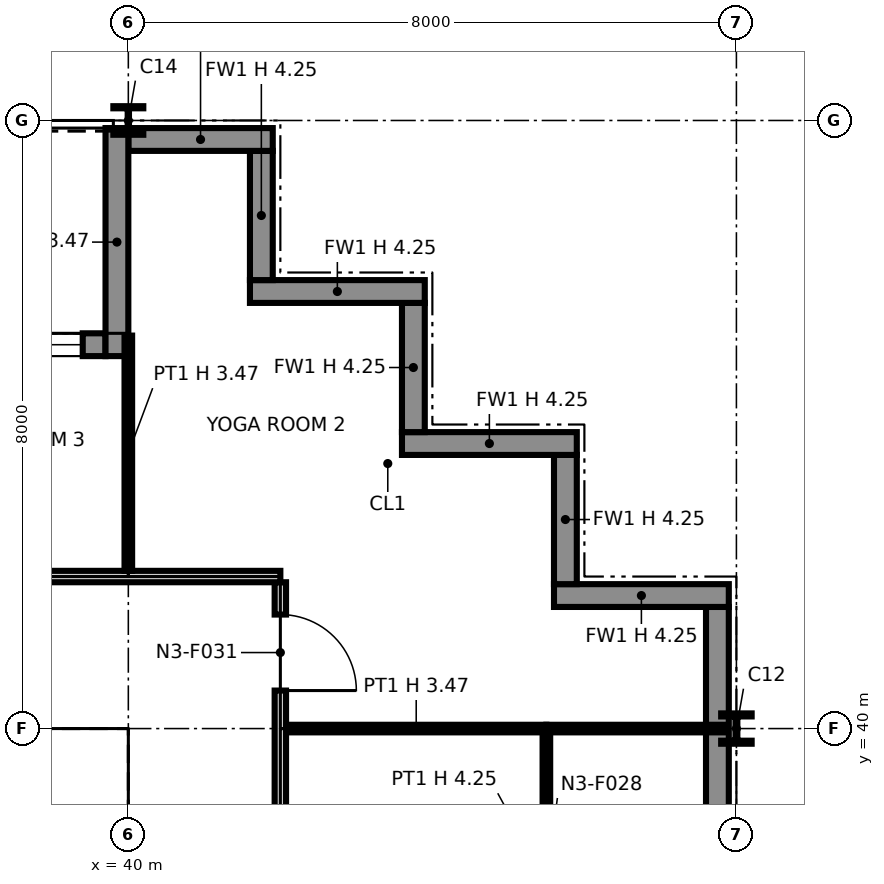
"""IFC4 building model, lengths in metres.
Left out: names, types, materials, properties, quantities, classifications, styles, units other than length and angle.
Written with IfcOpenShell. Run it as: python <this file> out.ifc"""

import sys

from ifc_helpers import new_model, si_unit, direction, frame, frame_2d, origin, origin_2d, place, context, subcontext, project, spatial, polyline, rectangle, i_section, outline, extrude, element, fill, save


model = new_model("IFC4")
c1 = context("Model", 3, precision=1e-05, world=origin(), true_north=direction((0.0, 1.0)))
c2 = subcontext(c1, "Body", "Model", "MODEL_VIEW")
j1 = project(units=[si_unit("LENGTHUNIT", "METRE"), si_unit("PLANEANGLEUNIT", "RADIAN")], contexts=[c1])
p1 = place(None, origin())
s1 = spatial("IfcSite", under=j1, at=p1, CompositionType="ELEMENT")
p2 = place(p1, origin())
s2 = spatial("IfcBuilding", under=s1, at=p2, CompositionType="ELEMENT")
p3 = place(p2, frame((0.0, 0.0, 70.0)))
s3 = spatial("IfcBuildingStorey", under=s2, at=p3, CompositionType="ELEMENT", Elevation=70.0)
p4 = place(p3, frame((40.0, 40.0, 0.0), z_axis=(0.0, 0.0, 1.0), x_axis=(1.0, 0.0, 0.0)))
e1 = element("IfcColumn", 1, at=p4, inside=s3, PredefinedType="COLUMN", context=c2, shape_type="SweptSolid", body=[
    extrude(i_section(OverallWidth=0.371, OverallDepth=0.361, WebThickness=0.012, FlangeThickness=0.02, at=origin_2d()), origin(), (0.0, 0.0, 1.0), 4.25),
])
p5 = place(p3, frame((40.0, 48.0, 0.0), z_axis=(0.0, 0.0, 1.0), x_axis=(1.0, 0.0, 0.0)))
e2 = element("IfcColumn", 2, at=p5, inside=s3, PredefinedType="COLUMN", context=c2, shape_type="SweptSolid", body=[
    extrude(i_section(OverallWidth=0.394, OverallDepth=0.376, WebThickness=0.017, FlangeThickness=0.028, at=origin_2d()), origin(), (0.0, 0.0, 1.0), 4.25),
])
p6 = place(p3, frame((48.0, 40.0, 0.0), z_axis=(0.0, 0.0, 1.0), x_axis=(1.0, 0.0, 0.0)))
e3 = element("IfcColumn", 3, at=p6, inside=s3, PredefinedType="COLUMN", context=c2, shape_type="SweptSolid", body=[
    extrude(i_section(OverallWidth=0.401, OverallDepth=0.399, WebThickness=0.025, FlangeThickness=0.04, at=origin_2d()), origin(), (0.0, 0.0, 1.0), 4.25),
])
p7 = place(p3, frame((47.75, 32.0, 0.0), z_axis=(0.0, 0.0, 1.0), x_axis=(0.0, 1.0, 0.0)))
e4 = element("IfcWall", 4, at=p7, inside=s3, PredefinedType="SOLIDWALL", context=c2, shape_type="SweptSolid", body=[
    extrude(rectangle(XDim=9.6, YDim=0.3, at=frame_2d((4.8, 0.0))), origin(), (0.0, 0.0, 1.0), 4.25),
])
p8 = place(p3, frame((47.9, 41.75, 0.0), z_axis=(0.0, 0.0, 1.0), x_axis=(-1.0, 0.0, 0.0)))
e5 = element("IfcWall", 5, at=p8, inside=s3, PredefinedType="SOLIDWALL", context=c2, shape_type="SweptSolid", body=[
    extrude(rectangle(XDim=2.3, YDim=0.3, at=frame_2d((1.15, 0.0))), origin(), (0.0, 0.0, 1.0), 4.25),
])
p9 = place(p3, frame((45.75, 41.9, 0.0), z_axis=(0.0, 0.0, 1.0), x_axis=(0.0, 1.0, 0.0)))
e6 = element("IfcWall", 6, at=p9, inside=s3, PredefinedType="SOLIDWALL", context=c2, shape_type="SweptSolid", body=[
    extrude(rectangle(XDim=1.7, YDim=0.3, at=frame_2d((0.85, 0.0))), origin(), (0.0, 0.0, 1.0), 4.25),
])
p10 = place(p3, frame((45.9, 43.75, 0.0), z_axis=(0.0, 0.0, 1.0), x_axis=(-1.0, 0.0, 0.0)))
e7 = element("IfcWall", 7, at=p10, inside=s3, PredefinedType="SOLIDWALL", context=c2, shape_type="SweptSolid", body=[
    extrude(rectangle(XDim=2.3, YDim=0.3, at=frame_2d((1.15, 0.0))), origin(), (0.0, 0.0, 1.0), 4.25),
])
p11 = place(p3, frame((43.75, 43.9, 0.0), z_axis=(0.0, 0.0, 1.0), x_axis=(0.0, 1.0, 0.0)))
e8 = element("IfcWall", 8, at=p11, inside=s3, PredefinedType="SOLIDWALL", context=c2, shape_type="SweptSolid", body=[
    extrude(rectangle(XDim=1.7, YDim=0.3, at=frame_2d((0.85, 0.0))), origin(), (0.0, 0.0, 1.0), 4.25),
])
p12 = place(p3, frame((43.9, 45.75, 0.0), z_axis=(0.0, 0.0, 1.0), x_axis=(-1.0, 0.0, 0.0)))
e9 = element("IfcWall", 9, at=p12, inside=s3, PredefinedType="SOLIDWALL", context=c2, shape_type="SweptSolid", body=[
    extrude(rectangle(XDim=2.3, YDim=0.3, at=frame_2d((1.15, 0.0))), origin(), (0.0, 0.0, 1.0), 4.25),
])
p13 = place(p3, frame((41.75, 45.9, 0.0), z_axis=(0.0, 0.0, 1.0), x_axis=(0.0, 1.0, 0.0)))
e10 = element("IfcWall", 10, at=p13, inside=s3, PredefinedType="SOLIDWALL", context=c2, shape_type="SweptSolid", body=[
    extrude(rectangle(XDim=1.7, YDim=0.3, at=frame_2d((0.85, 0.0))), origin(), (0.0, 0.0, 1.0), 4.25),
])
p14 = place(p3, frame((41.9, 47.75, 0.0), z_axis=(0.0, 0.0, 1.0), x_axis=(-1.0, 0.0, 0.0)))
e11 = element("IfcWall", 11, at=p14, inside=s3, PredefinedType="SOLIDWALL", context=c2, shape_type="SweptSolid", body=[
    extrude(rectangle(XDim=1.9, YDim=0.3, at=frame_2d((0.95, 0.0))), origin(), (0.0, 0.0, 1.0), 4.25),
])
p15 = place(p3, frame((39.7, 45.05, 0.0), z_axis=(0.0, 0.0, 1.0), x_axis=(-1.0, 0.0, 0.0)))
e12 = element("IfcWall", 12, at=p15, inside=s3, PredefinedType="SOLIDWALL", context=c2, shape_type="SweptSolid", body=[
    extrude(rectangle(XDim=7.4, YDim=0.3, at=frame_2d((3.7, 0.0))), origin(), (0.0, 0.0, 1.0), 4.25),
])
p16 = place(p15, frame((0.3, 0.0, 0.9)))
e13 = element("IfcOpeningElement", 13, at=p16, cuts=e12, PredefinedType="OPENING", context=c2, shape_type="SweptSolid", body=[
    extrude(rectangle(XDim=2.8, YDim=2.2, at=frame_2d((1.4, 1.1))), frame((0.0, 0.16, 0.0), z_axis=(0.0, -1.0, 0.0), x_axis=(1.0, 0.0, 0.0)), (0.0, 0.0, 1.0), 0.32),
])
p17 = place(p15, frame((4.7, 0.0, 0.0)))
e14 = element("IfcOpeningElement", 14, at=p17, cuts=e12, PredefinedType="OPENING", context=c2, shape_type="SweptSolid", body=[
    extrude(rectangle(XDim=2.0, YDim=2.4, at=frame_2d((1.0, 1.2))), frame((0.0, 0.16, 0.0), z_axis=(0.0, -1.0, 0.0), x_axis=(1.0, 0.0, 0.0)), (0.0, 0.0, 1.0), 0.32),
])
p18 = place(p3, frame((39.85, 47.9, 0.0), z_axis=(0.0, 0.0, 1.0), x_axis=(0.0, -1.0, 0.0)))
e15 = element("IfcWall", 15, at=p18, inside=s3, PredefinedType="SOLIDWALL", context=c2, shape_type="SweptSolid", body=[
    extrude(rectangle(XDim=3.0, YDim=0.3, at=frame_2d((1.5, 0.0))), origin(), (0.0, 0.0, 1.0), 3.469),
])
p19 = place(p3, frame((24.65, 39.25, 0.0), z_axis=(0.0, 0.0, 1.0), x_axis=(1.0, 0.0, 0.0)))
e16 = element("IfcWall", 16, at=p19, inside=s3, PredefinedType="PARTITIONING", context=c2, shape_type="SweptSolid", body=[
    extrude(outline(polyline([(0.0, 0.0), (14.7, 0.0), (14.7, 4.25), (7.469, 4.25), (7.469, 3.632), (7.231, 3.632), (7.23, 4.25), (0.0, 4.25), (0.0, 0.0)])), frame((0.0, 0.1, 0.0), z_axis=(0.0, -1.0, 0.0), x_axis=(1.0, 0.0, 0.0)), (0.0, 0.0, 1.0), 0.2),
])
p20 = place(p3, frame((39.25, 32.85, 0.0), z_axis=(0.0, 0.0, 1.0), x_axis=(0.0, 1.0, 0.0)))
e17 = element("IfcWall", 17, at=p20, inside=s3, PredefinedType="PARTITIONING", context=c2, shape_type="SweptSolid", body=[
    extrude(rectangle(XDim=6.3, YDim=0.2, at=frame_2d((3.15, 0.0))), origin(), (0.0, 0.0, 1.0), 4.25),
])
p21 = place(p3, frame((42.0, 16.0, 0.0), z_axis=(0.0, 0.0, 1.0), x_axis=(0.0, 1.0, 0.0)))
e18 = element("IfcWall", 18, at=p21, inside=s3, PredefinedType="PARTITIONING", context=c2, shape_type="SweptSolid", body=[
    extrude(outline(polyline([(0.0, 0.0), (25.925, 0.0), (25.925, 4.25), (24.3, 4.25), (24.298, 3.47), (23.702, 3.47), (23.7, 4.25), (20.3, 4.25), (20.298, 3.47), (19.702, 3.47), (19.7, 4.25), (16.3, 4.25), (16.298, 3.47), (15.702, 3.47), (15.7, 4.25), (12.3, 4.25), (12.298, 3.47), (11.702, 3.47), (11.7, 4.25), (8.3, 4.25), (8.298, 3.47), (7.702, 3.47), (7.7, 4.25), (4.3, 4.25), (4.298, 3.47), (3.702, 3.47), (3.7, 4.25), (0.0, 4.25), (0.0, 0.0)])), frame((0.0, 0.075, 0.0), z_axis=(0.0, -1.0, 0.0), x_axis=(1.0, 0.0, 0.0)), (0.0, 0.0, 1.0), 0.15),
])
p22 = place(p21, frame((2.5, 0.0, 0.0), z_axis=(0.0, 0.0, 1.0), x_axis=(-1.0, 0.0, 0.0)))
e19 = element("IfcOpeningElement", 19, at=p22, cuts=e18, PredefinedType="OPENING", context=c2, shape_type="SweptSolid", body=[
    extrude(rectangle(XDim=1.0, YDim=2.1, at=frame_2d((0.5, 1.05))), frame((0.0, 0.085, 0.0), z_axis=(0.0, -1.0, 0.0), x_axis=(1.0, 0.0, 0.0)), (0.0, 0.0, 1.0), 0.17),
])
p23 = place(p21, frame((6.5, 0.0, 0.0), z_axis=(0.0, 0.0, 1.0), x_axis=(-1.0, 0.0, 0.0)))
e20 = element("IfcOpeningElement", 20, at=p23, cuts=e18, PredefinedType="OPENING", context=c2, shape_type="SweptSolid", body=[
    extrude(rectangle(XDim=1.0, YDim=2.1, at=frame_2d((0.5, 1.05))), frame((0.0, 0.085, 0.0), z_axis=(0.0, -1.0, 0.0), x_axis=(1.0, 0.0, 0.0)), (0.0, 0.0, 1.0), 0.17),
])
p24 = place(p21, frame((9.3, 0.0, 0.0), z_axis=(0.0, 0.0, 1.0), x_axis=(-1.0, 0.0, 0.0)))
e21 = element("IfcOpeningElement", 21, at=p24, cuts=e18, PredefinedType="OPENING", context=c2, shape_type="SweptSolid", body=[
    extrude(rectangle(XDim=1.0, YDim=2.1, at=frame_2d((0.5, 1.05))), frame((0.0, 0.085, 0.0), z_axis=(0.0, -1.0, 0.0), x_axis=(1.0, 0.0, 0.0)), (0.0, 0.0, 1.0), 0.17),
])
p25 = place(p21, frame((14.5, 0.0, 0.0), z_axis=(0.0, 0.0, 1.0), x_axis=(-1.0, 0.0, 0.0)))
e22 = element("IfcOpeningElement", 22, at=p25, cuts=e18, PredefinedType="OPENING", context=c2, shape_type="SweptSolid", body=[
    extrude(rectangle(XDim=1.0, YDim=2.1, at=frame_2d((0.5, 1.05))), frame((0.0, 0.085, 0.0), z_axis=(0.0, -1.0, 0.0), x_axis=(1.0, 0.0, 0.0)), (0.0, 0.0, 1.0), 0.17),
])
p26 = place(p21, frame((18.5, 0.0, 0.0), z_axis=(0.0, 0.0, 1.0), x_axis=(-1.0, 0.0, 0.0)))
e23 = element("IfcOpeningElement", 23, at=p26, cuts=e18, PredefinedType="OPENING", context=c2, shape_type="SweptSolid", body=[
    extrude(rectangle(XDim=1.0, YDim=2.1, at=frame_2d((0.5, 1.05))), frame((0.0, 0.085, 0.0), z_axis=(0.0, -1.0, 0.0), x_axis=(1.0, 0.0, 0.0)), (0.0, 0.0, 1.0), 0.17),
])
p27 = place(p21, frame((22.5, 0.0, 0.0), z_axis=(0.0, 0.0, 1.0), x_axis=(-1.0, 0.0, 0.0)))
e24 = element("IfcOpeningElement", 24, at=p27, cuts=e18, PredefinedType="OPENING", context=c2, shape_type="SweptSolid", body=[
    extrude(rectangle(XDim=1.0, YDim=2.1, at=frame_2d((0.5, 1.05))), frame((0.0, 0.085, 0.0), z_axis=(0.0, -1.0, 0.0), x_axis=(1.0, 0.0, 0.0)), (0.0, 0.0, 1.0), 0.17),
])
p28 = place(p21, frame((25.5, 0.0, 0.0), z_axis=(0.0, 0.0, 1.0), x_axis=(-1.0, 0.0, 0.0)))
e25 = element("IfcOpeningElement", 25, at=p28, cuts=e18, PredefinedType="OPENING", context=c2, shape_type="SweptSolid", body=[
    extrude(rectangle(XDim=1.0, YDim=2.1, at=frame_2d((0.5, 1.05))), frame((0.0, 0.085, 0.0), z_axis=(0.0, -1.0, 0.0), x_axis=(1.0, 0.0, 0.0)), (0.0, 0.0, 1.0), 0.17),
])
p29 = place(p3, frame((45.5, 36.0, 0.0), z_axis=(0.0, 0.0, 1.0), x_axis=(0.0, 1.0, 0.0)))
e26 = element("IfcWall", 26, at=p29, inside=s3, PredefinedType="PARTITIONING", context=c2, shape_type="SweptSolid", body=[
    extrude(rectangle(XDim=3.95, YDim=0.1, at=frame_2d((1.975, 0.0))), origin(), (0.0, 0.0, 1.0), 4.25),
])
p30 = place(p29, frame((1.5, 0.0, 0.0)))
e27 = element("IfcOpeningElement", 27, at=p30, cuts=e26, PredefinedType="OPENING", context=c2, shape_type="SweptSolid", body=[
    extrude(rectangle(XDim=1.0, YDim=2.1, at=frame_2d((0.5, 1.05))), frame((0.0, 0.06, 0.0), z_axis=(0.0, -1.0, 0.0), x_axis=(1.0, 0.0, 0.0)), (0.0, 0.0, 1.0), 0.12),
])
p31 = place(p3, frame((42.075, 40.0, 0.0), z_axis=(0.0, 0.0, 1.0), x_axis=(1.0, 0.0, 0.0)))
e28 = element("IfcWall", 28, at=p31, inside=s3, PredefinedType="PARTITIONING", context=c2, shape_type="SweptSolid", body=[
    extrude(rectangle(XDim=3.425, YDim=0.1, at=frame_2d((1.712, 0.0))), origin(), (0.0, 0.0, 1.0), 3.47),
])
p32 = place(p3, frame((45.5, 40.0, 0.0), z_axis=(0.0, 0.0, 1.0), x_axis=(1.0, 0.0, 0.0)))
e29 = element("IfcWall", 29, at=p32, inside=s3, PredefinedType="PARTITIONING", context=c2, shape_type="SweptSolid", body=[
    extrude(rectangle(XDim=2.37, YDim=0.1, at=frame_2d((1.185, 0.0))), origin(), (0.0, 0.0, 1.0), 3.47),
])
p33 = place(p3, frame((8.05, 42.0, 0.0), z_axis=(0.0, 0.0, 1.0), x_axis=(1.0, 0.0, 0.0)))
e30 = element("IfcWall", 30, at=p33, inside=s3, PredefinedType="PARTITIONING", context=c2, shape_type="SweptSolid", body=[
    extrude(rectangle(XDim=33.95, YDim=0.15, at=frame_2d((16.975, 0.0))), origin(), (0.0, 0.0, 1.0), 4.25),
])
p34 = place(p33, frame((9.45, 0.0, 0.0)))
e31 = element("IfcOpeningElement", 31, at=p34, cuts=e30, PredefinedType="OPENING", context=c2, shape_type="SweptSolid", body=[
    extrude(rectangle(XDim=1.0, YDim=2.1, at=frame_2d((0.5, 1.05))), frame((0.0, 0.085, 0.0), z_axis=(0.0, -1.0, 0.0), x_axis=(1.0, 0.0, 0.0)), (0.0, 0.0, 1.0), 0.17),
])
p35 = place(p33, frame((13.45, 0.0, 0.0)))
e32 = element("IfcOpeningElement", 32, at=p35, cuts=e30, PredefinedType="OPENING", context=c2, shape_type="SweptSolid", body=[
    extrude(rectangle(XDim=1.0, YDim=2.1, at=frame_2d((0.5, 1.05))), frame((0.0, 0.085, 0.0), z_axis=(0.0, -1.0, 0.0), x_axis=(1.0, 0.0, 0.0)), (0.0, 0.0, 1.0), 0.17),
])
p36 = place(p33, frame((27.45, 0.0, 0.0)))
e33 = element("IfcOpeningElement", 33, at=p36, cuts=e30, PredefinedType="OPENING", context=c2, shape_type="SweptSolid", body=[
    extrude(rectangle(XDim=1.0, YDim=2.1, at=frame_2d((0.5, 1.05))), frame((0.0, 0.085, 0.0), z_axis=(0.0, -1.0, 0.0), x_axis=(1.0, 0.0, 0.0)), (0.0, 0.0, 1.0), 0.17),
])
p37 = place(p33, frame((1.45, 0.0, 0.0)))
e34 = element("IfcOpeningElement", 34, at=p37, cuts=e30, PredefinedType="OPENING", context=c2, shape_type="SweptSolid", body=[
    extrude(rectangle(XDim=1.0, YDim=2.1, at=frame_2d((0.5, 1.05))), frame((0.0, 0.085, 0.0), z_axis=(0.0, -1.0, 0.0), x_axis=(1.0, 0.0, 0.0)), (0.0, 0.0, 1.0), 0.17),
])
p38 = place(p33, frame((5.45, 0.0, 0.0)))
e35 = element("IfcOpeningElement", 35, at=p38, cuts=e30, PredefinedType="OPENING", context=c2, shape_type="SweptSolid", body=[
    extrude(rectangle(XDim=1.0, YDim=2.1, at=frame_2d((0.5, 1.05))), frame((0.0, 0.085, 0.0), z_axis=(0.0, -1.0, 0.0), x_axis=(1.0, 0.0, 0.0)), (0.0, 0.0, 1.0), 0.17),
])
p39 = place(p33, frame((17.45, 0.0, 0.0)))
e36 = element("IfcOpeningElement", 36, at=p39, cuts=e30, PredefinedType="OPENING", context=c2, shape_type="SweptSolid", body=[
    extrude(rectangle(XDim=1.0, YDim=2.1, at=frame_2d((0.5, 1.05))), frame((0.0, 0.085, 0.0), z_axis=(0.0, -1.0, 0.0), x_axis=(1.0, 0.0, 0.0)), (0.0, 0.0, 1.0), 0.17),
])
p40 = place(p33, frame((21.45, 0.0, 0.0)))
e37 = element("IfcOpeningElement", 37, at=p40, cuts=e30, PredefinedType="OPENING", context=c2, shape_type="SweptSolid", body=[
    extrude(rectangle(XDim=1.0, YDim=2.1, at=frame_2d((0.5, 1.05))), frame((0.0, 0.085, 0.0), z_axis=(0.0, -1.0, 0.0), x_axis=(1.0, 0.0, 0.0)), (0.0, 0.0, 1.0), 0.17),
])
p41 = place(p3, frame((40.0, 42.075, 0.0), z_axis=(0.0, 0.0, 1.0), x_axis=(0.0, 1.0, 0.0)))
e38 = element("IfcWall", 38, at=p41, inside=s3, PredefinedType="PARTITIONING", context=c2, shape_type="SweptSolid", body=[
    extrude(rectangle(XDim=3.095, YDim=0.1, at=frame_2d((1.547, 0.0))), origin(), (0.0, 0.0, 1.0), 3.47),
])
p42 = place(p16, origin())
e39 = element("IfcWindow", 39, at=p42, inside=s3, PartitioningType="SINGLE_PANEL", PredefinedType="WINDOW", context=c2, shape_type="SweptSolid", body=[
    extrude(rectangle(XDim=2.8, YDim=2.2, at=frame_2d((1.4, 1.1))), frame((0.0, 0.03, 0.0), z_axis=(0.0, -1.0, 0.0), x_axis=(1.0, 0.0, 0.0)), (0.0, 0.0, 1.0), 0.06),
])
fill(e13, e39)
p43 = place(p28, origin())
e40 = element("IfcDoor", 40, at=p43, inside=s3, OperationType="SINGLE_SWING_RIGHT", PredefinedType="DOOR", context=c2, shape_type="SweptSolid", body=[
    extrude(rectangle(XDim=1.0, YDim=2.1, at=frame_2d((0.5, 1.05))), frame((0.0, 0.025, 0.0), z_axis=(0.0, -1.0, 0.0), x_axis=(1.0, 0.0, 0.0)), (0.0, 0.0, 1.0), 0.05),
])
fill(e25, e40)
save(model, sys.argv[1])
